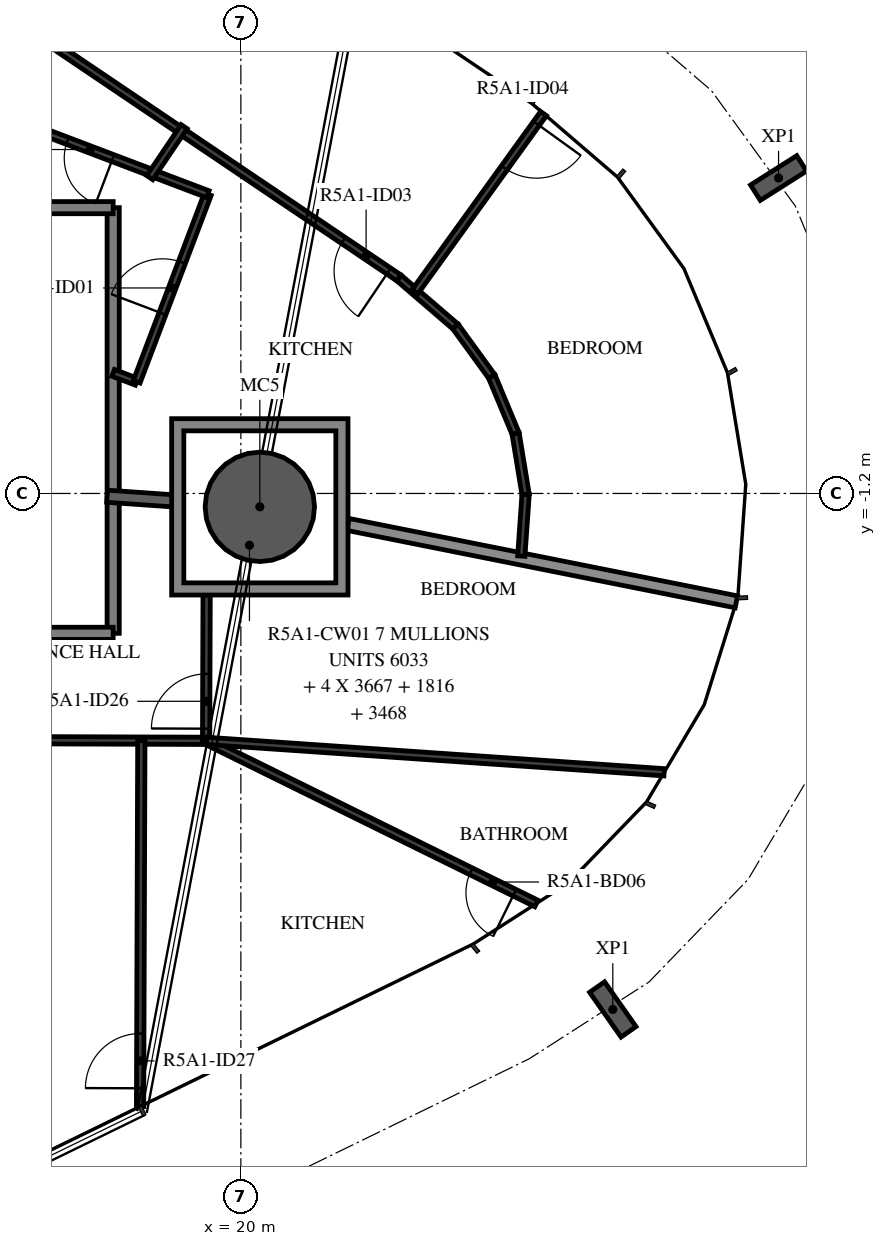
"""IFC4 building model, lengths in metres.
Left out: names, types, materials, properties, quantities, classifications, styles, units other than length and angle.
Written with IfcOpenShell. Run it as: python <this file> out.ifc"""

import sys

from ifc_helpers import new_model, si_unit, direction, frame, frame_2d, origin, origin_2d, place, context, subcontext, project, spatial, polyline, rectangle, hollow_circle, i_section, outline, extrude, element, fill, save


model = new_model("IFC4")
c1 = context("Model", 3, precision=1e-05, world=origin(), true_north=direction((0.0, 1.0)))
c2 = subcontext(c1, "Body", "Model", "MODEL_VIEW")
j1 = project(units=[si_unit("LENGTHUNIT", "METRE"), si_unit("PLANEANGLEUNIT", "RADIAN")], contexts=[c1])
p1 = place(None, origin())
s1 = spatial("IfcSite", under=j1, at=p1, CompositionType="ELEMENT")
p2 = place(p1, origin())
s2 = spatial("IfcBuilding", under=s1, at=p2, CompositionType="ELEMENT")
p3 = place(p2, frame((0.0, 0.0, 191.9)))
s3 = spatial("IfcBuildingStorey", under=s2, at=p3, CompositionType="ELEMENT", Elevation=191.9)
p4 = place(p3, frame((20.312, -1.42, -0.38), z_axis=(0.0, 0.0, 1.0), x_axis=(1.0, 0.0, 0.0)))
e1 = element("IfcColumn", 1, at=p4, inside=s3, PredefinedType="COLUMN", context=c2, shape_type="SweptSolid", body=[
    extrude(hollow_circle(Radius=0.9, WallThickness=0.04, at=origin_2d()), origin(), (0.0, 0.0, 1.0), 3.5),
])
for number, where, z_axis, x_axis in (
    (2, (26.117, -9.686, -0.38), (0.0, 0.0, 1.0), (-0.818, -0.575, 0.0)),
    (3, (28.842, 3.987, -0.38), (0.0, 0.0, 1.0), (0.535, -0.845, 0.0)),
):
    element("IfcColumn", number, at=place(p3, frame(where, z_axis=z_axis, x_axis=x_axis)), inside=s3, PredefinedType="COLUMN", context=c2, shape_type="SweptSolid", body=[
        extrude(i_section(OverallWidth=0.3, OverallDepth=0.9, WebThickness=0.019, FlangeThickness=0.035, FilletRadius=0.03, at=origin_2d()), origin(), (0.0, 0.0, 1.0), 3.5),
    ])
p5 = place(p3, frame((17.9, -3.5, 0.0), z_axis=(0.0, 0.0, 1.0), x_axis=(0.0, 1.0, 0.0)))
e4 = element("IfcWall", 4, at=p5, inside=s3, PredefinedType="STANDARD", context=c2, shape_type="SweptSolid", body=[
    extrude(rectangle(XDim=7.0, YDim=0.2, at=frame_2d((3.5, 0.0))), origin(), (0.0, 0.0, 1.0), 3.12),
])
p6 = place(p3, frame((17.9, 3.5, 0.0), z_axis=(0.0, 0.0, 1.0), x_axis=(-1.0, 0.0, 0.0)))
e5 = element("IfcWall", 5, at=p6, inside=s3, PredefinedType="STANDARD", context=c2, shape_type="SweptSolid", body=[
    extrude(rectangle(XDim=4.698, YDim=0.2, at=frame_2d((2.349, 0.0))), origin(), (0.0, 0.0, 1.0), 3.12),
])
p7 = place(p3, frame((13.188, -3.5, 0.0), z_axis=(0.0, 0.0, 1.0), x_axis=(1.0, 0.0, 0.0)))
e6 = element("IfcWall", 6, at=p7, inside=s3, PredefinedType="STANDARD", context=c2, shape_type="SweptSolid", body=[
    extrude(rectangle(XDim=4.712, YDim=0.2, at=frame_2d((2.356, 0.0))), origin(), (0.0, 0.0, 1.0), 3.12),
])
p8 = place(p3, frame((21.762, -1.709, 0.0), z_axis=(0.0, 0.0, 1.0), x_axis=(0.980707365343, -0.195481619501, 0.0)))
e7 = element("IfcWall", 7, at=p8, inside=s3, PredefinedType="STANDARD", context=c2, shape_type="SweptSolid", body=[
    extrude(rectangle(XDim=6.512, YDim=0.2, at=frame_2d((3.256, 0.0))), origin(), (0.0, 0.0, 1.0), 2.73),
])
p9 = place(p3, frame((17.8, -1.246, 0.0), z_axis=(0.0, 0.0, 1.0), x_axis=(0.997562681713, -0.069776042122, 0.0)))
e8 = element("IfcWall", 8, at=p9, inside=s3, PredefinedType="STANDARD", context=c2, shape_type="SweptSolid", body=[
    extrude(rectangle(XDim=1.144, YDim=0.2, at=frame_2d((0.572, 0.0))), origin(), (0.0, 0.0, 1.0), 3.12),
])
p10 = place(p3, frame((17.9, 0.783, 0.0), z_axis=(0.0, 0.0, 1.0), x_axis=(0.93513272442, -0.354297597677, 0.0)))
e9 = element("IfcWall", 9, at=p10, inside=s3, PredefinedType="PARTITIONING", context=c2, shape_type="SweptSolid", body=[
    extrude(rectangle(XDim=0.413, YDim=0.12, at=frame_2d((0.207, 0.0))), origin(), (0.0, 0.0, 1.0), 3.12),
])
p11 = place(p3, frame((18.286, 0.637, 0.0), z_axis=(0.0, 0.0, 1.0), x_axis=(0.354672075988, 0.934990758518, 0.0)))
e10 = element("IfcWall", 10, at=p11, inside=s3, PredefinedType="PARTITIONING", context=c2, shape_type="SweptSolid", body=[
    extrude(rectangle(XDim=3.3, YDim=0.12, at=frame_2d((1.65, 0.0))), origin(), (0.0, 0.0, 1.0), 3.12),
])
p12 = place(p11, frame((1.2, 0.0, 0.0)))
e11 = element("IfcOpeningElement", 11, at=p12, cuts=e10, PredefinedType="OPENING", context=c2, shape_type="SweptSolid", body=[
    extrude(rectangle(XDim=0.9, YDim=2.1, at=frame_2d((0.45, 1.05))), frame((0.0, 0.07, 0.0), z_axis=(0.0, -1.0, 0.0), x_axis=(1.0, 0.0, 0.0)), (0.0, 0.0, 1.0), 0.14),
])
p13 = place(p3, frame((19.456, 3.722, 0.0), z_axis=(0.0, 0.0, 1.0), x_axis=(-0.935017484321, 0.3546016131, 0.0)))
e12 = element("IfcWall", 12, at=p13, inside=s3, PredefinedType="PARTITIONING", context=c2, shape_type="SweptSolid", body=[
    extrude(rectangle(XDim=5.734, YDim=0.12, at=frame_2d((2.867, 0.0))), origin(), (0.0, 0.0, 1.0), 3.12),
])
p14 = place(p13, frame((1.669, 0.0, 0.0)))
e13 = element("IfcOpeningElement", 13, at=p14, cuts=e12, PredefinedType="OPENING", context=c2, shape_type="SweptSolid", body=[
    extrude(rectangle(XDim=0.8, YDim=2.1, at=frame_2d((0.4, 1.05))), frame((0.0, 0.07, 0.0), z_axis=(0.0, -1.0, 0.0), x_axis=(1.0, 0.0, 0.0)), (0.0, 0.0, 1.0), 0.14),
])
p15 = place(p3, frame((22.598, 2.345, 0.0), z_axis=(0.0, 0.0, 1.0), x_axis=(0.758596166141, -0.651561092083, 0.0)))
e14 = element("IfcWall", 14, at=p15, inside=s3, PredefinedType="PARTITIONING", context=c2, shape_type="SweptSolid", body=[
    extrude(rectangle(XDim=1.227, YDim=0.12, at=frame_2d((0.614, 0.0))), origin(), (0.0, 0.0, 1.0), 3.12),
])
p16 = place(p3, frame((23.529, 1.545, 0.0), z_axis=(0.0, 0.0, 1.0), x_axis=(0.587742994292, -0.809047694923, 0.0)))
e15 = element("IfcWall", 15, at=p16, inside=s3, PredefinedType="PARTITIONING", context=c2, shape_type="SweptSolid", body=[
    extrude(rectangle(XDim=1.016, YDim=0.12, at=frame_2d((0.508, 0.0))), origin(), (0.0, 0.0, 1.0), 3.12),
])
for number, where, z_axis, x_axis in (
    (16, (24.126, 0.723, 0.0), (0.0, 0.0, 1.0), (0.385, -0.923, 0.0)),
    (17, (24.518, -0.214, 0.0), (0.0, 0.0, 1.0), (0.162, -0.987, 0.0)),
    (18, (24.683, -1.217, 0.0), (0.0, 0.0, 1.0), (-0.07, -0.998, 0.0)),
):
    element("IfcWall", number, at=place(p3, frame(where, z_axis=z_axis, x_axis=x_axis)), inside=s3, PredefinedType="PARTITIONING", context=c2, shape_type="SweptSolid", body=[
        extrude(rectangle(XDim=1.016, YDim=0.12, at=frame_2d((0.508, 0.0))), origin(), (0.0, 0.0, 1.0), 3.12),
    ])
p17 = place(p3, frame((24.978, 5.047, 0.0), z_axis=(0.0, 0.0, 1.0), x_axis=(-0.585041443684, -0.811003396523, 0.0)))
e19 = element("IfcWall", 19, at=p17, inside=s3, PredefinedType="PARTITIONING", context=c2, shape_type="SweptSolid", body=[
    extrude(rectangle(XDim=3.613, YDim=0.12, at=frame_2d((1.807, 0.0))), origin(), (0.0, 0.0, 1.0), 3.12),
])
p18 = place(p17, frame((0.2, 0.0, 0.0)))
e20 = element("IfcOpeningElement", 20, at=p18, cuts=e19, PredefinedType="OPENING", context=c2, shape_type="SweptSolid", body=[
    extrude(rectangle(XDim=0.9, YDim=2.1, at=frame_2d((0.45, 1.05))), frame((0.0, 0.07, 0.0), z_axis=(0.0, -1.0, 0.0), x_axis=(1.0, 0.0, 0.0)), (0.0, 0.0, 1.0), 0.14),
])
p19 = place(p3, frame((22.598, 2.345, 0.0), z_axis=(0.0, 0.0, 1.0), x_axis=(-0.829034113947, 0.559198031034, 0.0)))
e21 = element("IfcWall", 21, at=p19, inside=s3, PredefinedType="PARTITIONING", context=c2, shape_type="SweptSolid", body=[
    extrude(rectangle(XDim=12.879, YDim=0.12, at=frame_2d((6.439, 0.0))), origin(), (0.0, 0.0, 1.0), 3.12),
])
p20 = place(p19, frame((0.2, 0.0, 0.0)))
e22 = element("IfcOpeningElement", 22, at=p20, cuts=e21, PredefinedType="OPENING", context=c2, shape_type="SweptSolid", body=[
    extrude(rectangle(XDim=0.9, YDim=2.1, at=frame_2d((0.45, 1.05))), frame((0.0, 0.07, 0.0), z_axis=(0.0, -1.0, 0.0), x_axis=(1.0, 0.0, 0.0)), (0.0, 0.0, 1.0), 0.14),
])
p21 = place(p3, frame((19.067, 4.832, 0.0), z_axis=(0.0, 0.0, 1.0), x_axis=(-0.559257363459, -0.828994090098, 0.0)))
e23 = element("IfcWall", 23, at=p21, inside=s3, PredefinedType="PARTITIONING", context=c2, shape_type="SweptSolid", body=[
    extrude(rectangle(XDim=1.012, YDim=0.12, at=frame_2d((0.506, 0.0))), origin(), (0.0, 0.0, 1.0), 3.12),
])
p22 = place(p3, frame((14.431, -5.251, 0.0), z_axis=(0.0, 0.0, 1.0), x_axis=(0.999994153659, -0.003419451456, 0.0)))
e24 = element("IfcWall", 24, at=p22, inside=s3, PredefinedType="PARTITIONING", context=c2, shape_type="SweptSolid", body=[
    extrude(rectangle(XDim=4.998, YDim=0.12, at=frame_2d((2.499, 0.0))), origin(), (0.0, 0.0, 1.0), 3.12),
])
p23 = place(p3, frame((19.429, -5.268, 0.0), z_axis=(0.0, 0.0, 1.0), x_axis=(0.003360127656, 0.999994354755, 0.0)))
e25 = element("IfcWall", 25, at=p23, inside=s3, PredefinedType="PARTITIONING", context=c2, shape_type="SweptSolid", body=[
    extrude(rectangle(XDim=2.398, YDim=0.12, at=frame_2d((1.199, 0.0))), origin(), (0.0, 0.0, 1.0), 3.12),
])
p24 = place(p23, frame((0.2, 0.0, 0.0)))
e26 = element("IfcOpeningElement", 26, at=p24, cuts=e25, PredefinedType="OPENING", context=c2, shape_type="SweptSolid", body=[
    extrude(rectangle(XDim=0.9, YDim=2.1, at=frame_2d((0.45, 1.05))), frame((0.0, 0.07, 0.0), z_axis=(0.0, -1.0, 0.0), x_axis=(1.0, 0.0, 0.0)), (0.0, 0.0, 1.0), 0.14),
])
p25 = place(p3, frame((18.343, -11.282, 0.0), z_axis=(0.0, 0.0, 1.0), x_axis=(0.003448675073, 0.999994053302, 0.0)))
e27 = element("IfcWall", 27, at=p25, inside=s3, PredefinedType="PARTITIONING", context=c2, shape_type="SweptSolid", body=[
    extrude(rectangle(XDim=6.017, YDim=0.12, at=frame_2d((3.009, 0.0))), origin(), (0.0, 0.0, 1.0), 3.12),
])
p26 = place(p25, frame((0.3, 0.0, 0.0)))
e28 = element("IfcOpeningElement", 28, at=p26, cuts=e27, PredefinedType="OPENING", context=c2, shape_type="SweptSolid", body=[
    extrude(rectangle(XDim=0.9, YDim=2.1, at=frame_2d((0.45, 1.05))), frame((0.0, 0.07, 0.0), z_axis=(0.0, -1.0, 0.0), x_axis=(1.0, 0.0, 0.0)), (0.0, 0.0, 1.0), 0.14),
])
p27 = place(p3, frame((24.861, -7.943, 0.0), z_axis=(0.0, 0.0, 1.0), x_axis=(-0.897128390861, 0.441769906525, 0.0)))
e29 = element("IfcWall", 29, at=p27, inside=s3, PredefinedType="PARTITIONING", context=c2, shape_type="SweptSolid", body=[
    extrude(rectangle(XDim=6.055, YDim=0.12, at=frame_2d((3.027, 0.0))), origin(), (0.0, 0.0, 1.0), 3.12),
])
p28 = place(p27, frame((0.4, 0.0, 0.0)))
e30 = element("IfcOpeningElement", 30, at=p28, cuts=e29, PredefinedType="OPENING", context=c2, shape_type="SweptSolid", body=[
    extrude(rectangle(XDim=0.8, YDim=2.1, at=frame_2d((0.4, 1.05))), frame((0.0, 0.07, 0.0), z_axis=(0.0, -1.0, 0.0), x_axis=(1.0, 0.0, 0.0)), (0.0, 0.0, 1.0), 0.14),
])
p29 = place(p3, frame((26.961, -5.785, 0.0), z_axis=(0.0, 0.0, 1.0), x_axis=(-0.997652165985, 0.068484711466, 0.0)))
e31 = element("IfcWall", 31, at=p29, inside=s3, PredefinedType="PARTITIONING", context=c2, shape_type="SweptSolid", body=[
    extrude(rectangle(XDim=7.551, YDim=0.12, at=frame_2d((3.775, 0.0))), origin(), (0.0, 0.0, 1.0), 3.12),
])
p30 = place(p3, origin())
e32 = element("IfcWall", 32, at=p30, inside=s3, PredefinedType="STANDARD", context=c2, shape_type="SweptSolid", body=[
    extrude(outline(polyline([(21.762, 0.03), (21.762, -2.87), (18.862, -2.87), (18.862, 0.03), (21.762, 0.03)]), holes=[polyline([(19.062, -2.67), (21.562, -2.67), (21.562, -0.17), (19.062, -0.17), (19.062, -2.67)])]), origin(), (0.0, 0.0, 1.0), 3.12),
])
p31 = place(p12, origin())
e33 = element("IfcDoor", 33, at=p31, inside=s3, OperationType="SINGLE_SWING_LEFT", PredefinedType="DOOR", context=c2, shape_type="SweptSolid", body=[
    extrude(rectangle(XDim=0.9, YDim=2.1, at=frame_2d((0.45, 1.05))), frame((0.0, 0.025, 0.0), z_axis=(0.0, -1.0, 0.0), x_axis=(1.0, 0.0, 0.0)), (0.0, 0.0, 1.0), 0.05),
])
fill(e11, e33)
p32 = place(p14, origin())
e34 = element("IfcDoor", 34, at=p32, inside=s3, OperationType="SINGLE_SWING_LEFT", PredefinedType="DOOR", context=c2, shape_type="SweptSolid", body=[
    extrude(rectangle(XDim=0.8, YDim=2.1, at=frame_2d((0.4, 1.05))), frame((0.0, 0.025, 0.0), z_axis=(0.0, -1.0, 0.0), x_axis=(1.0, 0.0, 0.0)), (0.0, 0.0, 1.0), 0.05),
])
fill(e13, e34)
p33 = place(p20, origin())
e35 = element("IfcDoor", 35, at=p33, inside=s3, OperationType="SINGLE_SWING_LEFT", PredefinedType="DOOR", context=c2, shape_type="SweptSolid", body=[
    extrude(rectangle(XDim=0.9, YDim=2.1, at=frame_2d((0.45, 1.05))), frame((0.0, 0.025, 0.0), z_axis=(0.0, -1.0, 0.0), x_axis=(1.0, 0.0, 0.0)), (0.0, 0.0, 1.0), 0.05),
])
fill(e22, e35)
p34 = place(p18, origin())
e36 = element("IfcDoor", 36, at=p34, inside=s3, OperationType="SINGLE_SWING_LEFT", PredefinedType="DOOR", context=c2, shape_type="SweptSolid", body=[
    extrude(rectangle(XDim=0.9, YDim=2.1, at=frame_2d((0.45, 1.05))), frame((0.0, 0.025, 0.0), z_axis=(0.0, -1.0, 0.0), x_axis=(1.0, 0.0, 0.0)), (0.0, 0.0, 1.0), 0.05),
])
fill(e20, e36)
p35 = place(p24, origin())
e37 = element("IfcDoor", 37, at=p35, inside=s3, OperationType="SINGLE_SWING_RIGHT", PredefinedType="DOOR", context=c2, shape_type="SweptSolid", body=[
    extrude(rectangle(XDim=0.9, YDim=2.1, at=frame_2d((0.45, 1.05))), frame((0.0, 0.025, 0.0), z_axis=(0.0, -1.0, 0.0), x_axis=(1.0, 0.0, 0.0)), (0.0, 0.0, 1.0), 0.05),
])
fill(e26, e37)
p36 = place(p26, origin())
e38 = element("IfcDoor", 38, at=p36, inside=s3, OperationType="SINGLE_SWING_RIGHT", PredefinedType="DOOR", context=c2, shape_type="SweptSolid", body=[
    extrude(rectangle(XDim=0.9, YDim=2.1, at=frame_2d((0.45, 1.05))), frame((0.0, 0.025, 0.0), z_axis=(0.0, -1.0, 0.0), x_axis=(1.0, 0.0, 0.0)), (0.0, 0.0, 1.0), 0.05),
])
fill(e28, e38)
p37 = place(p28, origin())
e39 = element("IfcDoor", 39, at=p37, inside=s3, OperationType="SINGLE_SWING_RIGHT", PredefinedType="DOOR", context=c2, shape_type="SweptSolid", body=[
    extrude(rectangle(XDim=0.8, YDim=2.1, at=frame_2d((0.4, 1.05))), frame((0.0, 0.025, 0.0), z_axis=(0.0, -1.0, 0.0), x_axis=(1.0, 0.0, 0.0)), (0.0, 0.0, 1.0), 0.05),
])
fill(e30, e39)
save(model, sys.argv[1])
